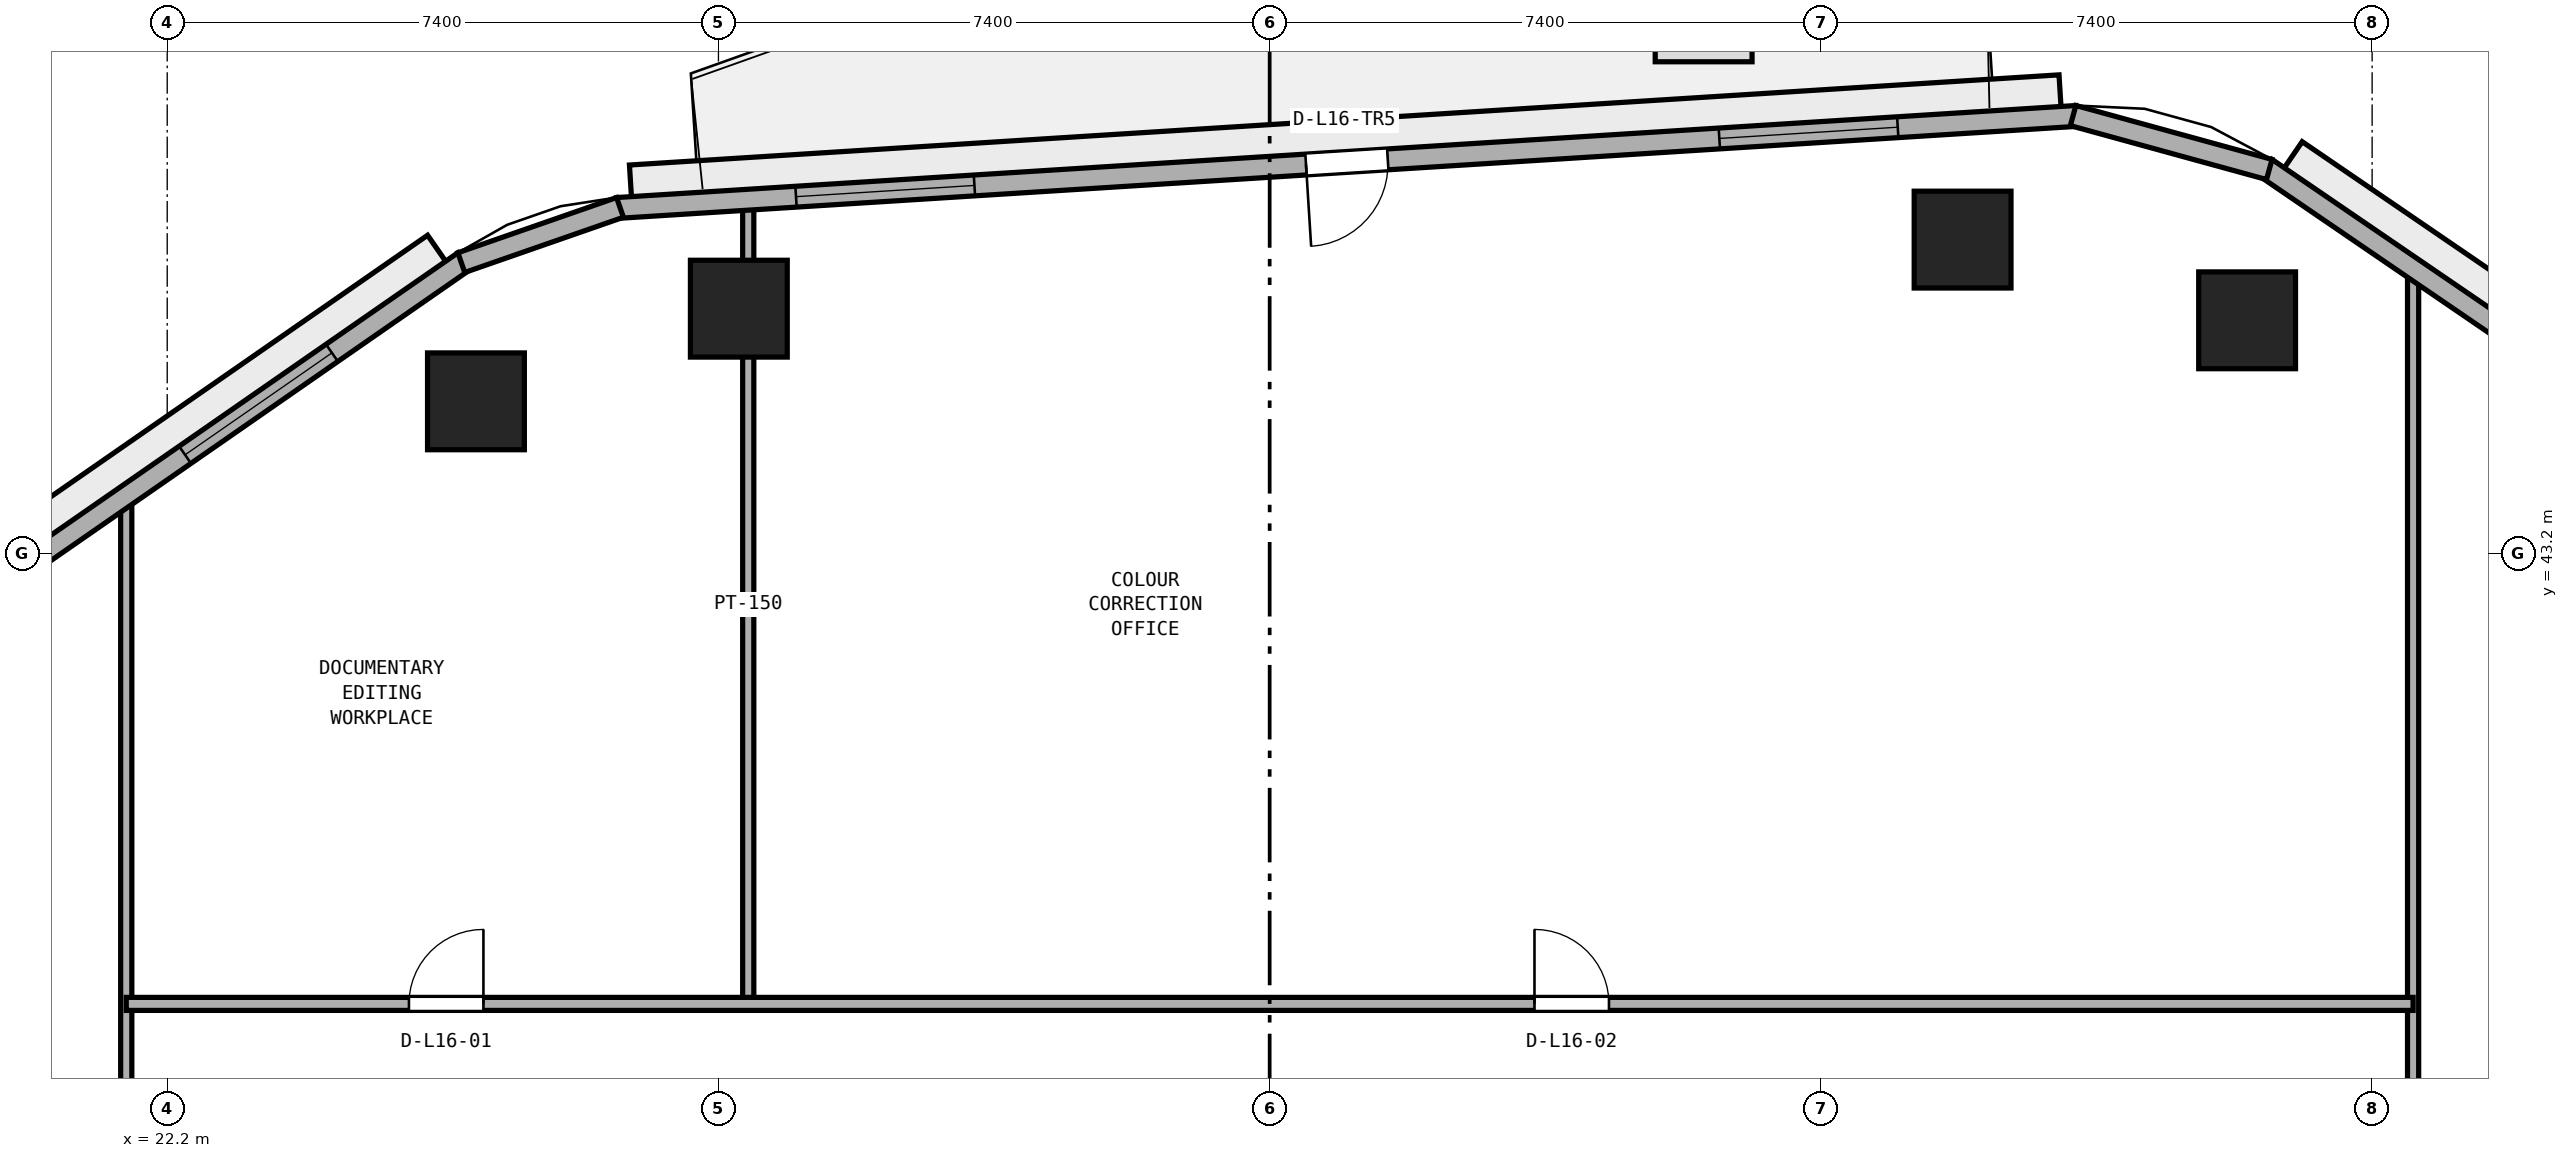
"""IFC4 building model, lengths in metres.
Left out: names, types, materials, properties, quantities, classifications, styles, units other than length and angle.
Written with IfcOpenShell. Run it as: python <this file> out.ifc"""

import sys

from ifc_helpers import new_model, si_unit, direction, frame, frame_2d, origin, origin_2d, place, context, subcontext, project, spatial, rectangle, extrude, element, fill, save


model = new_model("IFC4")
c1 = context("Model", 3, precision=1e-05, world=origin(), true_north=direction((0.0, 1.0)))
c2 = subcontext(c1, "Body", "Model", "MODEL_VIEW")
j1 = project(units=[si_unit("LENGTHUNIT", "METRE"), si_unit("PLANEANGLEUNIT", "RADIAN")], contexts=[c1])
p1 = place(None, origin())
s1 = spatial("IfcSite", under=j1, at=p1, CompositionType="ELEMENT")
p2 = place(p1, origin())
s2 = spatial("IfcBuilding", under=s1, at=p2, CompositionType="ELEMENT")
p3 = place(p2, frame((0.0, 0.0, 66.8)))
s3 = spatial("IfcBuildingStorey", under=s2, at=p3, CompositionType="ELEMENT", Elevation=66.8)
for number, where, z_axis, x_axis in (
    (1, (50.122, 46.326, 0.0), (0.0, 0.0, 1.0), (1.0, 0.0, 0.0)),
    (2, (46.302, 47.409, 0.0), (0.0, 0.0, 1.0), (1.0, 0.0, 0.0)),
    (3, (29.874, 46.482, 0.0), (0.0, 0.0, 1.0), (1.0, 0.0, 0.0)),
    (4, (26.344, 45.238, 0.0), (0.0, 0.0, 1.0), (1.0, 0.0, 0.0)),
):
    element("IfcColumn", number, at=place(p3, frame(where, z_axis=z_axis, x_axis=x_axis)), inside=s3, PredefinedType="COLUMN", context=c2, shape_type="SweptSolid", body=[
        extrude(rectangle(XDim=1.3, YDim=1.3, at=origin_2d()), origin(), (0.0, 0.0, 1.0), 3.8),
    ])
p4 = place(p3, frame((52.35, 3.611, 0.0), z_axis=(0.0, 0.0, 1.0), x_axis=(0.0, 1.0, 0.0)))
e5 = element("IfcWall", 5, at=p4, inside=s3, PredefinedType="PARTITIONING", context=c2, shape_type="SweptSolid", body=[
    extrude(rectangle(XDim=43.441, YDim=0.15, at=frame_2d((21.72, 0.0))), origin(), (0.0, 0.0, 1.0), 3.525),
])
p5 = place(p4, frame((12.364, 0.0, 0.0)))
e6 = element("IfcOpeningElement", 6, at=p5, cuts=e5, PredefinedType="OPENING", context=c2, shape_type="SweptSolid", body=[
    extrude(rectangle(XDim=0.9, YDim=2.1, at=frame_2d((0.45, 1.05))), frame((0.0, 0.085, 0.0), z_axis=(0.0, -1.0, 0.0), x_axis=(1.0, 0.0, 0.0)), (0.0, 0.0, 1.0), 0.17),
])
p6 = place(p4, frame((18.889, 0.0, 0.0)))
e7 = element("IfcOpeningElement", 7, at=p6, cuts=e5, PredefinedType="OPENING", context=c2, shape_type="SweptSolid", body=[
    extrude(rectangle(XDim=1.0, YDim=2.12, at=frame_2d((0.5, 1.06))), frame((0.0, 0.085, 0.0), z_axis=(0.0, -1.0, 0.0), x_axis=(1.0, 0.0, 0.0)), (0.0, 0.0, 1.0), 0.17),
])
p7 = place(p4, frame((25.689, 0.0, 0.0)))
e8 = element("IfcOpeningElement", 8, at=p7, cuts=e5, PredefinedType="OPENING", context=c2, shape_type="SweptSolid", body=[
    extrude(rectangle(XDim=1.0, YDim=2.12, at=frame_2d((0.5, 1.06))), frame((0.0, 0.085, 0.0), z_axis=(0.0, -1.0, 0.0), x_axis=(1.0, 0.0, 0.0)), (0.0, 0.0, 1.0), 0.17),
])
p8 = place(p4, frame((31.114, 0.0, 0.0)))
e9 = element("IfcOpeningElement", 9, at=p8, cuts=e5, PredefinedType="OPENING", context=c2, shape_type="SweptSolid", body=[
    extrude(rectangle(XDim=0.9, YDim=2.1, at=frame_2d((0.45, 1.05))), frame((0.0, 0.085, 0.0), z_axis=(0.0, -1.0, 0.0), x_axis=(1.0, 0.0, 0.0)), (0.0, 0.0, 1.0), 0.17),
])
p9 = place(p3, frame((30.0, 37.15, 0.0), z_axis=(0.0, 0.0, 1.0), x_axis=(0.0, 1.0, 0.0)))
e10 = element("IfcWall", 10, at=p9, inside=s3, PredefinedType="PARTITIONING", context=c2, shape_type="SweptSolid", body=[
    extrude(rectangle(XDim=10.73, YDim=0.15, at=frame_2d((5.365, 0.0))), origin(), (0.0, 0.0, 1.0), 2.908),
])
p10 = place(p3, frame((21.65, 6.119, 0.0), z_axis=(0.0, 0.0, 1.0), x_axis=(0.0, 1.0, 0.0)))
e11 = element("IfcWall", 11, at=p10, inside=s3, PredefinedType="PARTITIONING", context=c2, shape_type="SweptSolid", body=[
    extrude(rectangle(XDim=37.884, YDim=0.15, at=frame_2d((18.942, 0.0))), origin(), (0.0, 0.0, 1.0), 3.525),
])
p11 = place(p10, frame((13.556, 0.0, 0.0)))
e12 = element("IfcOpeningElement", 12, at=p11, cuts=e11, PredefinedType="OPENING", context=c2, shape_type="SweptSolid", body=[
    extrude(rectangle(XDim=0.9, YDim=2.1, at=frame_2d((0.45, 1.05))), frame((0.0, 0.085, 0.0), z_axis=(0.0, -1.0, 0.0), x_axis=(1.0, 0.0, 0.0)), (0.0, 0.0, 1.0), 0.17),
])
p12 = place(p10, frame((25.506, 0.0, 0.0)))
e13 = element("IfcOpeningElement", 13, at=p12, cuts=e11, PredefinedType="OPENING", context=c2, shape_type="SweptSolid", body=[
    extrude(rectangle(XDim=0.9, YDim=2.1, at=frame_2d((0.45, 1.05))), frame((0.0, 0.085, 0.0), z_axis=(0.0, -1.0, 0.0), x_axis=(1.0, 0.0, 0.0)), (0.0, 0.0, 1.0), 0.17),
])
p13 = place(p3, frame((21.65, 37.15, 0.0), z_axis=(0.0, 0.0, 1.0), x_axis=(1.0, 0.0, 0.0)))
e14 = element("IfcWall", 14, at=p13, inside=s3, PredefinedType="PARTITIONING", context=c2, shape_type="SweptSolid", body=[
    extrude(rectangle(XDim=30.7, YDim=0.175, at=frame_2d((15.35, 0.0))), origin(), (0.0, 0.0, 1.0), 3.525),
])
p14 = place(p13, frame((3.795, 0.0, 0.0)))
e15 = element("IfcOpeningElement", 15, at=p14, cuts=e14, PredefinedType="OPENING", context=c2, shape_type="SweptSolid", body=[
    extrude(rectangle(XDim=1.0, YDim=2.12, at=frame_2d((0.5, 1.06))), frame((0.0, 0.097, 0.0), z_axis=(0.0, -1.0, 0.0), x_axis=(1.0, 0.0, 0.0)), (0.0, 0.0, 1.0), 0.195),
])
p15 = place(p13, frame((18.905, 0.0, 0.0)))
e16 = element("IfcOpeningElement", 16, at=p15, cuts=e14, PredefinedType="OPENING", context=c2, shape_type="SweptSolid", body=[
    extrude(rectangle(XDim=1.0, YDim=2.12, at=frame_2d((0.5, 1.06))), frame((0.0, 0.097, 0.0), z_axis=(0.0, -1.0, 0.0), x_axis=(1.0, 0.0, 0.0)), (0.0, 0.0, 1.0), 0.195),
])
p16 = place(p3, frame((64.29, 38.867, 0.0), z_axis=(0.0, 0.0, 1.0), x_axis=(-0.825755550159, 0.564028165416, 0.0)))
e17 = element("IfcWall", 17, at=p16, inside=s3, PredefinedType="STANDARD", context=c2, shape_type="SweptSolid", body=[
    extrude(rectangle(XDim=16.848, YDim=0.28, at=frame_2d((8.424, 0.0))), origin(), (0.0, 0.0, 1.0), 3.525),
])
p17 = place(p16, frame((1.941, 0.0, 0.9)))
e18 = element("IfcOpeningElement", 18, at=p17, cuts=e17, PredefinedType="OPENING", context=c2, shape_type="SweptSolid", body=[
    extrude(rectangle(XDim=2.4, YDim=1.75, at=frame_2d((1.2, 0.875))), frame((0.0, 0.15, 0.0), z_axis=(0.0, -1.0, 0.0), x_axis=(1.0, 0.0, 0.0)), (0.0, 0.0, 1.0), 0.3),
])
p18 = place(p16, frame((7.224, 0.0, 0.9)))
e19 = element("IfcOpeningElement", 19, at=p18, cuts=e17, PredefinedType="OPENING", context=c2, shape_type="SweptSolid", body=[
    extrude(rectangle(XDim=2.4, YDim=1.75, at=frame_2d((1.2, 0.875))), frame((0.0, 0.15, 0.0), z_axis=(0.0, -1.0, 0.0), x_axis=(1.0, 0.0, 0.0)), (0.0, 0.0, 1.0), 0.3),
])
p19 = place(p3, frame((47.832, 49.069, 0.0), z_axis=(0.0, 0.0, 1.0), x_axis=(-0.998017725054, -0.062933460723, 0.0)))
e20 = element("IfcWall", 20, at=p19, inside=s3, PredefinedType="STANDARD", context=c2, shape_type="SweptSolid", body=[
    extrude(rectangle(XDim=19.629, YDim=0.28, at=frame_2d((9.815, 0.0))), origin(), (0.0, 0.0, 1.0), 3.525),
])
p20 = place(p19, frame((9.265, 0.0, 0.0)))
e21 = element("IfcOpeningElement", 21, at=p20, cuts=e20, PredefinedType="OPENING", context=c2, shape_type="SweptSolid", body=[
    extrude(rectangle(XDim=1.1, YDim=2.2, at=frame_2d((0.55, 1.1))), frame((0.0, 0.15, 0.0), z_axis=(0.0, -1.0, 0.0), x_axis=(1.0, 0.0, 0.0)), (0.0, 0.0, 1.0), 0.3),
])
p21 = place(p19, frame((2.405, 0.0, 0.9)))
e22 = element("IfcOpeningElement", 22, at=p21, cuts=e20, PredefinedType="OPENING", context=c2, shape_type="SweptSolid", body=[
    extrude(rectangle(XDim=2.4, YDim=1.75, at=frame_2d((1.2, 0.875))), frame((0.0, 0.15, 0.0), z_axis=(0.0, -1.0, 0.0), x_axis=(1.0, 0.0, 0.0)), (0.0, 0.0, 1.0), 0.3),
])
p22 = place(p19, frame((14.825, 0.0, 0.9)))
e23 = element("IfcOpeningElement", 23, at=p22, cuts=e20, PredefinedType="OPENING", context=c2, shape_type="SweptSolid", body=[
    extrude(rectangle(XDim=2.4, YDim=1.75, at=frame_2d((1.2, 0.875))), frame((0.0, 0.15, 0.0), z_axis=(0.0, -1.0, 0.0), x_axis=(1.0, 0.0, 0.0)), (0.0, 0.0, 1.0), 0.3),
])
p23 = place(p3, frame((26.182, 47.118, 0.0), z_axis=(0.0, 0.0, 1.0), x_axis=(-0.821547956627, -0.570139417127, 0.0)))
e24 = element("IfcWall", 24, at=p23, inside=s3, PredefinedType="STANDARD", context=c2, shape_type="SweptSolid", body=[
    extrude(rectangle(XDim=18.132, YDim=0.28, at=frame_2d((9.066, 0.0))), origin(), (0.0, 0.0, 1.0), 3.525),
])
p24 = place(p23, frame((2.156, 0.0, 0.9)))
e25 = element("IfcOpeningElement", 25, at=p24, cuts=e24, PredefinedType="OPENING", context=c2, shape_type="SweptSolid", body=[
    extrude(rectangle(XDim=2.4, YDim=1.75, at=frame_2d((1.2, 0.875))), frame((0.0, 0.15, 0.0), z_axis=(0.0, -1.0, 0.0), x_axis=(1.0, 0.0, 0.0)), (0.0, 0.0, 1.0), 0.3),
])
p25 = place(p23, frame((7.866, 0.0, 0.9)))
e26 = element("IfcOpeningElement", 26, at=p25, cuts=e24, PredefinedType="OPENING", context=c2, shape_type="SweptSolid", body=[
    extrude(rectangle(XDim=2.4, YDim=1.75, at=frame_2d((1.2, 0.875))), frame((0.0, 0.15, 0.0), z_axis=(0.0, -1.0, 0.0), x_axis=(1.0, 0.0, 0.0)), (0.0, 0.0, 1.0), 0.3),
])
p26 = place(p23, frame((13.577, 0.0, 0.9)))
e27 = element("IfcOpeningElement", 27, at=p26, cuts=e24, PredefinedType="OPENING", context=c2, shape_type="SweptSolid", body=[
    extrude(rectangle(XDim=2.4, YDim=1.75, at=frame_2d((1.2, 0.875))), frame((0.0, 0.15, 0.0), z_axis=(0.0, -1.0, 0.0), x_axis=(1.0, 0.0, 0.0)), (0.0, 0.0, 1.0), 0.3),
])
p27 = place(p3, frame((50.419, 48.351, 0.0), z_axis=(0.0, 0.0, 1.0), x_axis=(-0.964254516967, 0.264977784933, 0.0)))
e28 = element("IfcWall", 28, at=p27, inside=s3, PredefinedType="STANDARD", context=c2, shape_type="SweptSolid", body=[
    extrude(rectangle(XDim=2.731, YDim=0.28, at=frame_2d((1.365, 0.0))), origin(), (0.0, 0.0, 1.0), 3.525),
])
p28 = place(p3, frame((28.278, 47.842, 0.0), z_axis=(0.0, 0.0, 1.0), x_axis=(-0.9444559001, -0.328638179106, 0.0)))
e29 = element("IfcWall", 29, at=p28, inside=s3, PredefinedType="STANDARD", context=c2, shape_type="SweptSolid", body=[
    extrude(rectangle(XDim=2.255, YDim=0.28, at=frame_2d((1.128, 0.0))), origin(), (0.0, 0.0, 1.0), 3.525),
])
p29 = place(p14, origin())
e30 = element("IfcDoor", 30, at=p29, inside=s3, OperationType="SINGLE_SWING_RIGHT", PredefinedType="DOOR", context=c2, shape_type="SweptSolid", body=[
    extrude(rectangle(XDim=1.0, YDim=2.12, at=frame_2d((0.5, 1.06))), frame((0.0, 0.025, 0.0), z_axis=(0.0, -1.0, 0.0), x_axis=(1.0, 0.0, 0.0)), (0.0, 0.0, 1.0), 0.05),
])
fill(e15, e30)
p30 = place(p15, origin())
e31 = element("IfcDoor", 31, at=p30, inside=s3, OperationType="SINGLE_SWING_LEFT", PredefinedType="DOOR", context=c2, shape_type="SweptSolid", body=[
    extrude(rectangle(XDim=1.0, YDim=2.12, at=frame_2d((0.5, 1.06))), frame((0.0, 0.025, 0.0), z_axis=(0.0, -1.0, 0.0), x_axis=(1.0, 0.0, 0.0)), (0.0, 0.0, 1.0), 0.05),
])
fill(e16, e31)
p31 = place(p20, origin())
e32 = element("IfcDoor", 32, at=p31, inside=s3, OperationType="SINGLE_SWING_RIGHT", PredefinedType="DOOR", context=c2, shape_type="SweptSolid", body=[
    extrude(rectangle(XDim=1.1, YDim=2.2, at=frame_2d((0.55, 1.1))), frame((0.0, 0.025, 0.0), z_axis=(0.0, -1.0, 0.0), x_axis=(1.0, 0.0, 0.0)), (0.0, 0.0, 1.0), 0.05),
])
fill(e21, e32)
p32 = place(p21, origin())
e33 = element("IfcWindow", 33, at=p32, inside=s3, PartitioningType="SINGLE_PANEL", PredefinedType="WINDOW", context=c2, shape_type="SweptSolid", body=[
    extrude(rectangle(XDim=2.4, YDim=1.75, at=frame_2d((1.2, 0.875))), frame((0.0, 0.03, 0.0), z_axis=(0.0, -1.0, 0.0), x_axis=(1.0, 0.0, 0.0)), (0.0, 0.0, 1.0), 0.06),
])
fill(e22, e33)
p33 = place(p22, origin())
e34 = element("IfcWindow", 34, at=p33, inside=s3, PartitioningType="SINGLE_PANEL", PredefinedType="WINDOW", context=c2, shape_type="SweptSolid", body=[
    extrude(rectangle(XDim=2.4, YDim=1.75, at=frame_2d((1.2, 0.875))), frame((0.0, 0.03, 0.0), z_axis=(0.0, -1.0, 0.0), x_axis=(1.0, 0.0, 0.0)), (0.0, 0.0, 1.0), 0.06),
])
fill(e23, e34)
p34 = place(p24, origin())
e35 = element("IfcWindow", 35, at=p34, inside=s3, PartitioningType="SINGLE_PANEL", PredefinedType="WINDOW", context=c2, shape_type="SweptSolid", body=[
    extrude(rectangle(XDim=2.4, YDim=1.75, at=frame_2d((1.2, 0.875))), frame((0.0, 0.03, 0.0), z_axis=(0.0, -1.0, 0.0), x_axis=(1.0, 0.0, 0.0)), (0.0, 0.0, 1.0), 0.06),
])
fill(e25, e35)
save(model, sys.argv[1])
